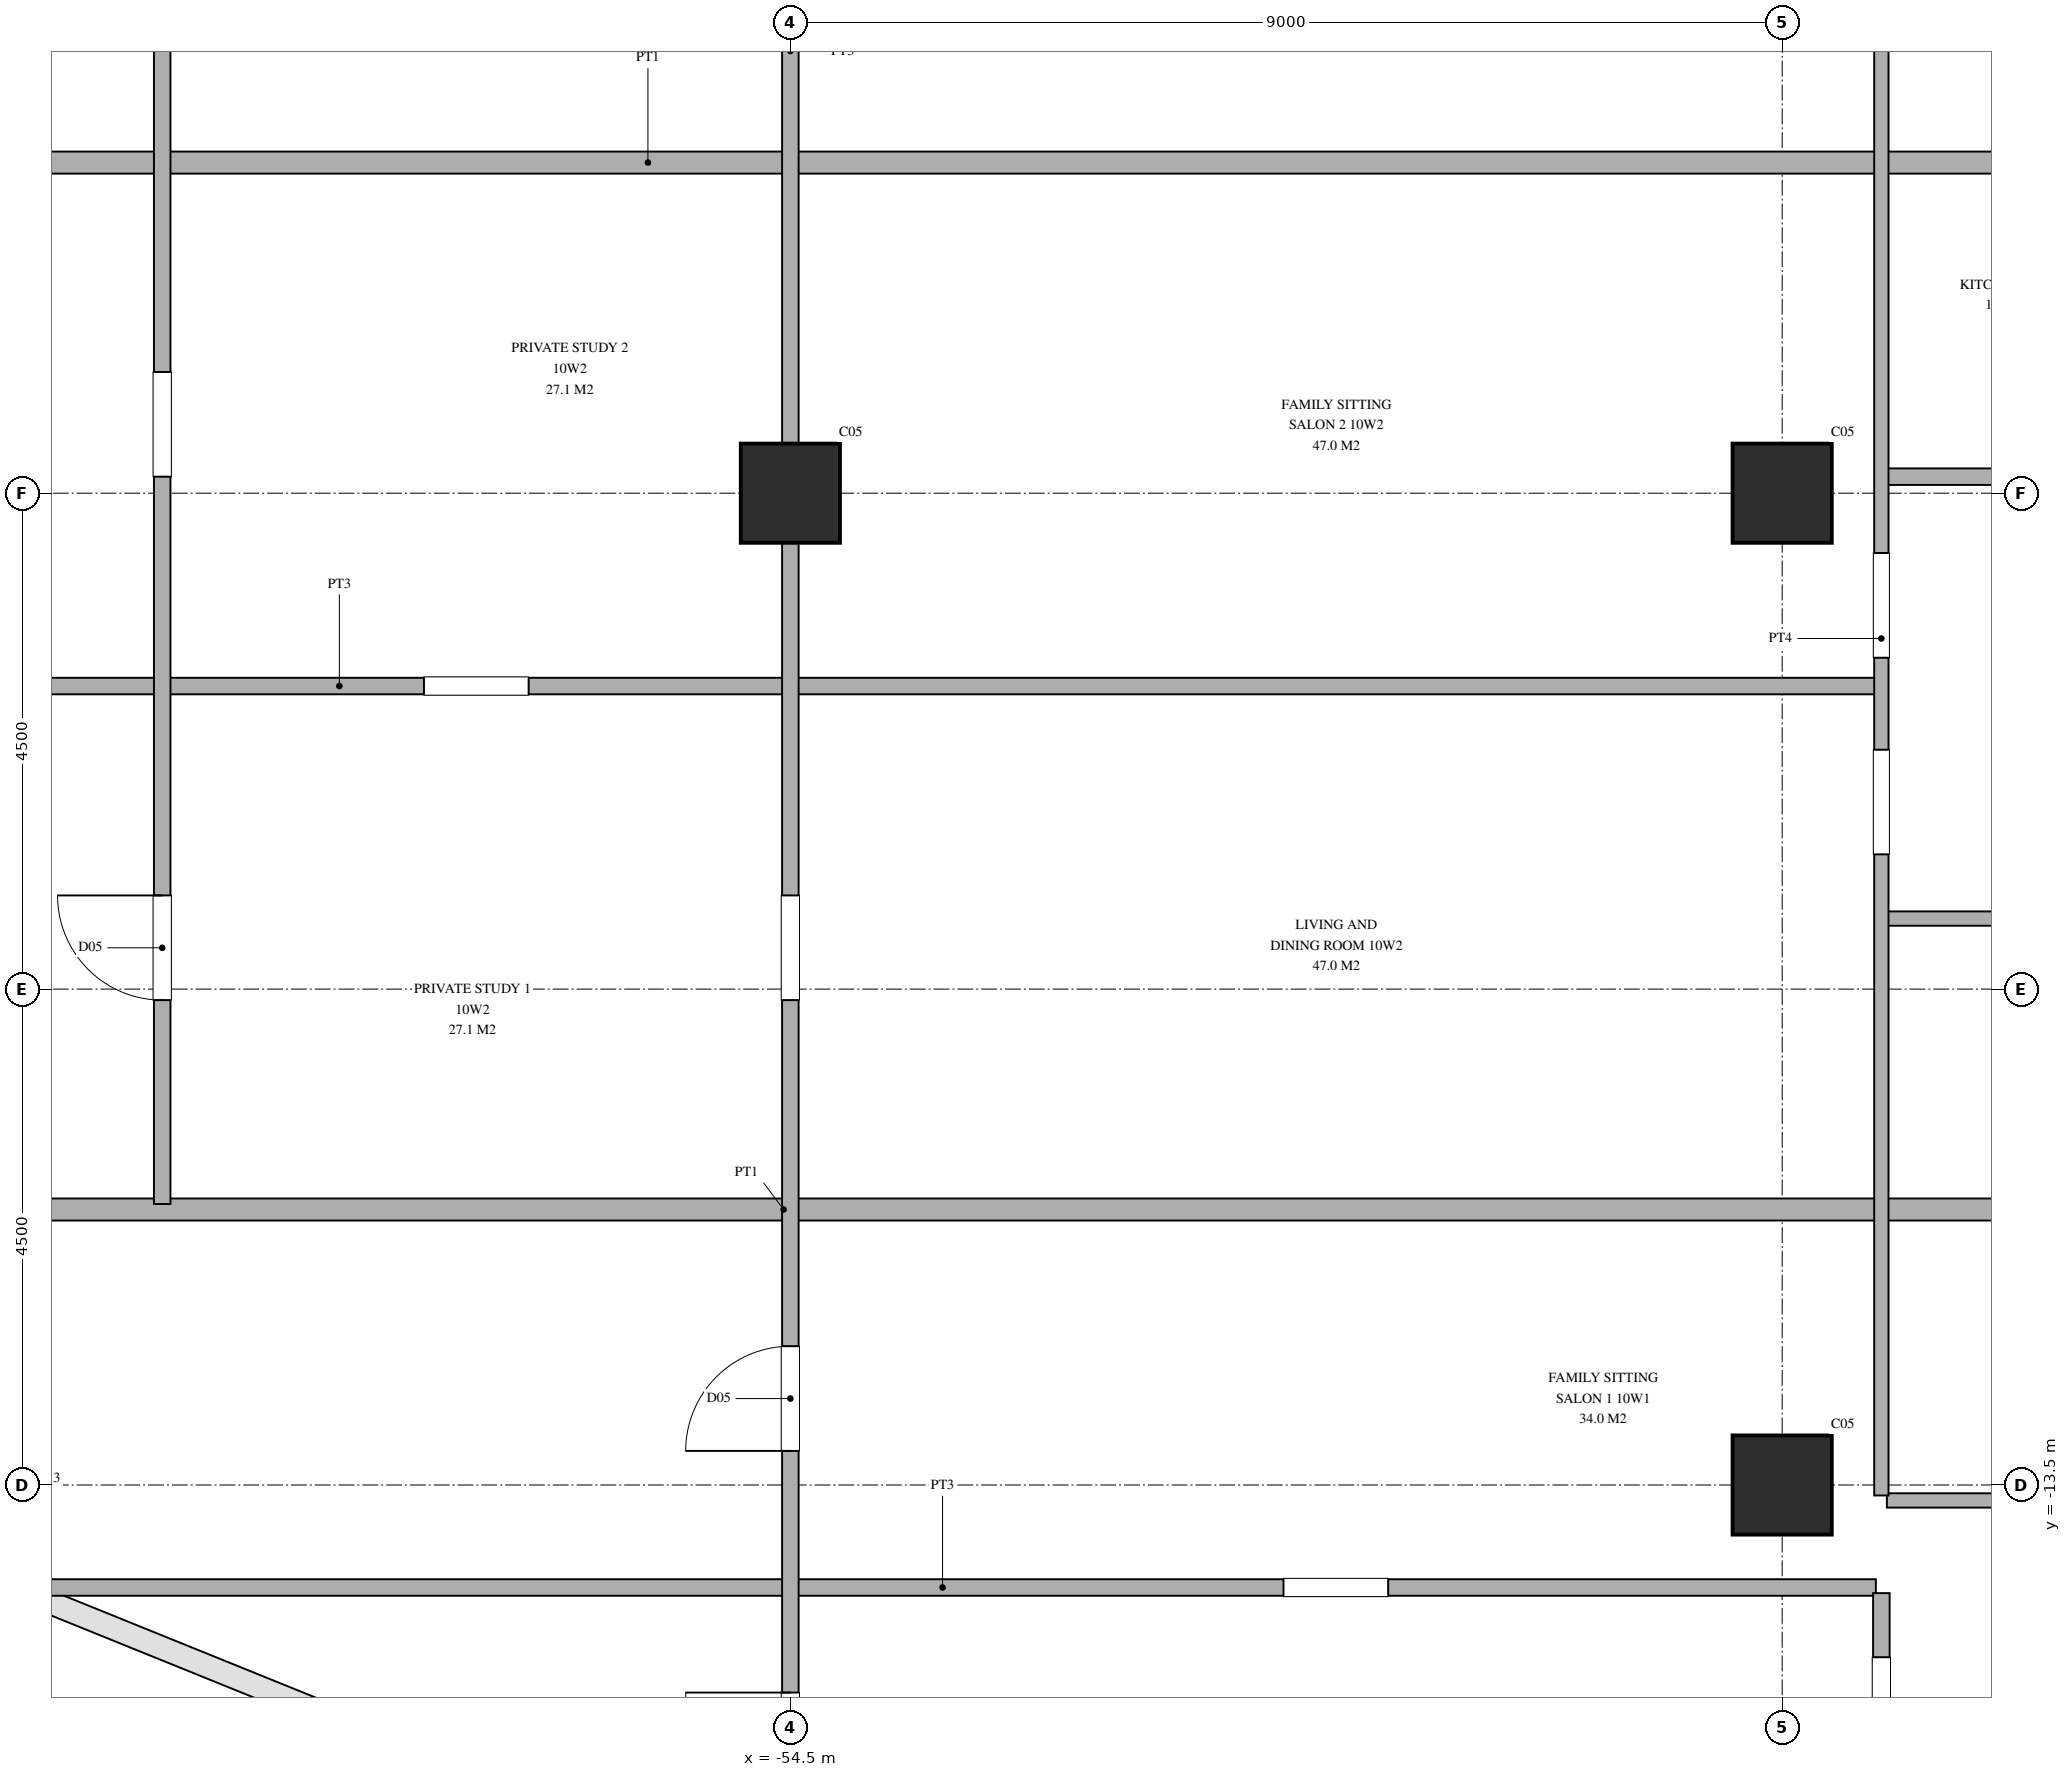
"""IFC4 building model, lengths in metres.
Left out: names, types, materials, properties, quantities, classifications, styles, units other than length and angle.
Written with IfcOpenShell. Run it as: python <this file> out.ifc"""

import sys

from ifc_helpers import new_model, si_unit, direction, frame, frame_2d, origin, origin_2d, place, context, subcontext, project, spatial, rectangle, i_section, extrude, source, transform, mapped, element, fill, save


model = new_model("IFC4")
c1 = context("Model", 3, precision=1e-05, world=origin(), true_north=direction((0.0, 1.0)))
c2 = subcontext(c1, "Body", "Model", "MODEL_VIEW")
j1 = project(units=[si_unit("LENGTHUNIT", "METRE"), si_unit("PLANEANGLEUNIT", "RADIAN")], contexts=[c1])
p1 = place(None, origin())
s1 = spatial("IfcSite", under=j1, at=p1, CompositionType="ELEMENT")
p2 = place(p1, origin())
s2 = spatial("IfcBuilding", under=s1, at=p2, CompositionType="ELEMENT")
p3 = place(p2, frame((0.0, 0.0, 40.5)))
s3 = spatial("IfcBuildingStorey", under=s2, at=p3, CompositionType="ELEMENT", Elevation=40.5)
m1 = source(origin(), c2, "Body", "SweptSolid", [
    extrude(i_section(OverallWidth=0.9, OverallDepth=0.9, WebThickness=0.036, FlangeThickness=0.055, at=origin_2d()), origin(), (0.0, 0.0, 1.0), 3.6),
])
for number, where, z_axis, x_axis in (
    (1, (-45.5, -13.5, 0.0), (0.0, 0.0, 1.0), (1.0, 0.0, 0.0)),
    (2, (-45.5, -4.5, 0.0), (0.0, 0.0, 1.0), (1.0, 0.0, 0.0)),
    (3, (-54.5, -4.5, 0.0), (0.0, 0.0, 1.0), (1.0, 0.0, 0.0)),
):
    element("IfcColumn", number, at=place(p3, frame(where, z_axis=z_axis, x_axis=x_axis)), inside=s3, PredefinedType="COLUMN", context=c2, shape_type="MappedRepresentation", body=[
        mapped(m1, transform((0.0, 0.0, 0.0), scale=1.0)),
    ])
p4 = place(p3, frame((-61.588, -14.43, 0.0), z_axis=(0.0, 0.0, 1.0), x_axis=(1.0, 0.0, 0.0)))
e4 = element("IfcWall", 4, at=p4, inside=s3, PredefinedType="PARTITIONING", context=c2, shape_type="SweptSolid", body=[
    extrude(rectangle(XDim=16.938, YDim=0.15, at=frame_2d((8.469, 0.0))), origin(), (0.0, 0.0, 1.0), 3.38),
])
p5 = place(p4, frame((11.563, 0.0, 0.0)))
e5 = element("IfcOpeningElement", 5, at=p5, cuts=e4, PredefinedType="OPENING", context=c2, shape_type="SweptSolid", body=[
    extrude(rectangle(XDim=0.95, YDim=2.15, at=frame_2d((0.475, 1.075))), frame((0.0, 0.085, 0.0), z_axis=(0.0, -1.0, 0.0), x_axis=(1.0, 0.0, 0.0)), (0.0, 0.0, 1.0), 0.17),
])
p6 = place(p3, frame((-44.55, -13.64, 0.0), z_axis=(0.0, 0.0, 1.0), x_axis=(1.0, 0.0, 0.0)))
e6 = element("IfcWall", 6, at=p6, inside=s3, PredefinedType="PARTITIONING", context=c2, shape_type="SweptSolid", body=[
    extrude(rectangle(XDim=5.5, YDim=0.13, at=frame_2d((2.75, 0.0))), origin(), (0.0, 0.0, 1.0), 2.68),
])
p7 = place(p6, frame((2.31, 0.0, 0.0)))
e7 = element("IfcOpeningElement", 7, at=p7, cuts=e6, PredefinedType="OPENING", context=c2, shape_type="SweptSolid", body=[
    extrude(rectangle(XDim=0.88, YDim=2.1, at=frame_2d((0.44, 1.05))), frame((0.0, 0.075, 0.0), z_axis=(0.0, -1.0, 0.0), x_axis=(1.0, 0.0, 0.0)), (0.0, 0.0, 1.0), 0.15),
])
p8 = place(p3, frame((-70.043, -11.0, 0.0), z_axis=(0.0, 0.0, 1.0), x_axis=(1.0, 0.0, 0.0)))
e8 = element("IfcWall", 8, at=p8, inside=s3, PredefinedType="PARTITIONING", context=c2, shape_type="SweptSolid", body=[
    extrude(rectangle(XDim=30.963, YDim=0.2, at=frame_2d((15.481, 0.0))), origin(), (0.0, 0.0, 1.0), 3.38),
])
p9 = place(p3, frame((-44.55, -8.36, 0.0), z_axis=(0.0, 0.0, 1.0), x_axis=(1.0, 0.0, 0.0)))
e9 = element("IfcWall", 9, at=p9, inside=s3, PredefinedType="PARTITIONING", context=c2, shape_type="SweptSolid", body=[
    extrude(rectangle(XDim=5.5, YDim=0.13, at=frame_2d((2.75, 0.0))), origin(), (0.0, 0.0, 1.0), 3.38),
])
p10 = place(p9, frame((2.31, 0.0, 0.0)))
e10 = element("IfcOpeningElement", 10, at=p10, cuts=e9, PredefinedType="OPENING", context=c2, shape_type="SweptSolid", body=[
    extrude(rectangle(XDim=0.88, YDim=2.1, at=frame_2d((0.44, 1.05))), frame((0.0, 0.075, 0.0), z_axis=(0.0, -1.0, 0.0), x_axis=(1.0, 0.0, 0.0)), (0.0, 0.0, 1.0), 0.15),
])
p11 = place(p3, frame((-72.535, -6.25, 0.0), z_axis=(0.0, 0.0, 1.0), x_axis=(1.0, 0.0, 0.0)))
e11 = element("IfcWall", 11, at=p11, inside=s3, PredefinedType="PARTITIONING", context=c2, shape_type="SweptSolid", body=[
    extrude(rectangle(XDim=27.885, YDim=0.15, at=frame_2d((13.942, 0.0))), origin(), (0.0, 0.0, 1.0), 3.38),
])
p12 = place(p11, frame((14.71, 0.0, 0.0)))
e12 = element("IfcOpeningElement", 12, at=p12, cuts=e11, PredefinedType="OPENING", context=c2, shape_type="SweptSolid", body=[
    extrude(rectangle(XDim=0.95, YDim=2.15, at=frame_2d((0.475, 1.075))), frame((0.0, 0.085, 0.0), z_axis=(0.0, -1.0, 0.0), x_axis=(1.0, 0.0, 0.0)), (0.0, 0.0, 1.0), 0.17),
])
p13 = place(p3, frame((-44.55, -4.35, 0.0), z_axis=(0.0, 0.0, 1.0), x_axis=(1.0, 0.0, 0.0)))
e13 = element("IfcWall", 13, at=p13, inside=s3, PredefinedType="PARTITIONING", context=c2, shape_type="SweptSolid", body=[
    extrude(rectangle(XDim=5.5, YDim=0.15, at=frame_2d((2.75, 0.0))), origin(), (0.0, 0.0, 1.0), 2.68),
])
p14 = place(p13, frame((2.275, 0.0, 0.0)))
e14 = element("IfcOpeningElement", 14, at=p14, cuts=e13, PredefinedType="OPENING", context=c2, shape_type="SweptSolid", body=[
    extrude(rectangle(XDim=0.95, YDim=2.15, at=frame_2d((0.475, 1.075))), frame((0.0, 0.085, 0.0), z_axis=(0.0, -1.0, 0.0), x_axis=(1.0, 0.0, 0.0)), (0.0, 0.0, 1.0), 0.17),
])
p15 = place(p3, frame((-72.505, -1.5, 0.0), z_axis=(0.0, 0.0, 1.0), x_axis=(1.0, 0.0, 0.0)))
e15 = element("IfcWall", 15, at=p15, inside=s3, PredefinedType="PARTITIONING", context=c2, shape_type="SweptSolid", body=[
    extrude(rectangle(XDim=33.425, YDim=0.2, at=frame_2d((16.712, 0.0))), origin(), (0.0, 0.0, 1.0), 3.38),
])
p16 = place(p3, frame((-60.2, -10.95, 0.0), z_axis=(0.0, 0.0, 1.0), x_axis=(0.0, 1.0, 0.0)))
e16 = element("IfcWall", 16, at=p16, inside=s3, PredefinedType="PARTITIONING", context=c2, shape_type="SweptSolid", body=[
    extrude(rectangle(XDim=22.4, YDim=0.15, at=frame_2d((11.2, 0.0))), origin(), (0.0, 0.0, 1.0), 3.38),
])
p17 = place(p16, frame((1.85, 0.0, 0.0)))
e17 = element("IfcOpeningElement", 17, at=p17, cuts=e16, PredefinedType="OPENING", context=c2, shape_type="SweptSolid", body=[
    extrude(rectangle(XDim=0.95, YDim=2.15, at=frame_2d((0.475, 1.075))), frame((0.0, 0.085, 0.0), z_axis=(0.0, -1.0, 0.0), x_axis=(1.0, 0.0, 0.0)), (0.0, 0.0, 1.0), 0.17),
])
p18 = place(p16, frame((6.6, 0.0, 0.0)))
e18 = element("IfcOpeningElement", 18, at=p18, cuts=e16, PredefinedType="OPENING", context=c2, shape_type="SweptSolid", body=[
    extrude(rectangle(XDim=0.95, YDim=2.15, at=frame_2d((0.475, 1.075))), frame((0.0, 0.085, 0.0), z_axis=(0.0, -1.0, 0.0), x_axis=(1.0, 0.0, 0.0)), (0.0, 0.0, 1.0), 0.17),
])
p19 = place(p16, frame((11.142, 0.0, 0.0)))
e19 = element("IfcOpeningElement", 19, at=p19, cuts=e16, PredefinedType="OPENING", context=c2, shape_type="SweptSolid", body=[
    extrude(rectangle(XDim=0.95, YDim=2.15, at=frame_2d((0.475, 1.075))), frame((0.0, 0.085, 0.0), z_axis=(0.0, -1.0, 0.0), x_axis=(1.0, 0.0, 0.0)), (0.0, 0.0, 1.0), 0.17),
])
p20 = place(p16, frame((15.475, 0.0, 0.0)))
e20 = element("IfcOpeningElement", 20, at=p20, cuts=e16, PredefinedType="OPENING", context=c2, shape_type="SweptSolid", body=[
    extrude(rectangle(XDim=0.95, YDim=2.15, at=frame_2d((0.475, 1.075))), frame((0.0, 0.085, 0.0), z_axis=(0.0, -1.0, 0.0), x_axis=(1.0, 0.0, 0.0)), (0.0, 0.0, 1.0), 0.17),
])
p21 = place(p16, frame((19.808, 0.0, 0.0)))
e21 = element("IfcOpeningElement", 21, at=p21, cuts=e16, PredefinedType="OPENING", context=c2, shape_type="SweptSolid", body=[
    extrude(rectangle(XDim=0.95, YDim=2.15, at=frame_2d((0.475, 1.075))), frame((0.0, 0.085, 0.0), z_axis=(0.0, -1.0, 0.0), x_axis=(1.0, 0.0, 0.0)), (0.0, 0.0, 1.0), 0.17),
])
p22 = place(p3, frame((-54.5, -17.321, 0.0), z_axis=(0.0, 0.0, 1.0), x_axis=(0.0, 1.0, 0.0)))
e22 = element("IfcWall", 22, at=p22, inside=s3, PredefinedType="PARTITIONING", context=c2, shape_type="SweptSolid", body=[
    extrude(rectangle(XDim=33.667, YDim=0.15, at=frame_2d((16.833, 0.0))), origin(), (0.0, 0.0, 1.0), 2.68),
])
p23 = place(p22, frame((0.988, 0.0, 0.0)))
e23 = element("IfcOpeningElement", 23, at=p23, cuts=e22, PredefinedType="OPENING", context=c2, shape_type="SweptSolid", body=[
    extrude(rectangle(XDim=0.95, YDim=2.15, at=frame_2d((0.475, 1.075))), frame((0.0, 0.085, 0.0), z_axis=(0.0, -1.0, 0.0), x_axis=(1.0, 0.0, 0.0)), (0.0, 0.0, 1.0), 0.17),
])
p24 = place(p22, frame((4.131, 0.0, 0.0)))
e24 = element("IfcOpeningElement", 24, at=p24, cuts=e22, PredefinedType="OPENING", context=c2, shape_type="SweptSolid", body=[
    extrude(rectangle(XDim=0.95, YDim=2.15, at=frame_2d((0.475, 1.075))), frame((0.0, 0.085, 0.0), z_axis=(0.0, -1.0, 0.0), x_axis=(1.0, 0.0, 0.0)), (0.0, 0.0, 1.0), 0.17),
])
p25 = place(p22, frame((8.221, 0.0, 0.0)))
e25 = element("IfcOpeningElement", 25, at=p25, cuts=e22, PredefinedType="OPENING", context=c2, shape_type="SweptSolid", body=[
    extrude(rectangle(XDim=0.95, YDim=2.15, at=frame_2d((0.475, 1.075))), frame((0.0, 0.085, 0.0), z_axis=(0.0, -1.0, 0.0), x_axis=(1.0, 0.0, 0.0)), (0.0, 0.0, 1.0), 0.17),
])
p26 = place(p22, frame((22.357, 0.0, 0.0)))
e26 = element("IfcOpeningElement", 26, at=p26, cuts=e22, PredefinedType="OPENING", context=c2, shape_type="SweptSolid", body=[
    extrude(rectangle(XDim=0.95, YDim=2.15, at=frame_2d((0.475, 1.075))), frame((0.0, 0.085, 0.0), z_axis=(0.0, -1.0, 0.0), x_axis=(1.0, 0.0, 0.0)), (0.0, 0.0, 1.0), 0.17),
])
p27 = place(p22, frame((30.794, 0.0, 0.0)))
e27 = element("IfcOpeningElement", 27, at=p27, cuts=e22, PredefinedType="OPENING", context=c2, shape_type="SweptSolid", body=[
    extrude(rectangle(XDim=0.95, YDim=2.15, at=frame_2d((0.475, 1.075))), frame((0.0, 0.085, 0.0), z_axis=(0.0, -1.0, 0.0), x_axis=(1.0, 0.0, 0.0)), (0.0, 0.0, 1.0), 0.17),
])
p28 = place(p3, frame((-44.6, -21.328, 0.0), z_axis=(0.0, 0.0, 1.0), x_axis=(0.0, 1.0, 0.0)))
e28 = element("IfcWall", 28, at=p28, inside=s3, PredefinedType="PARTITIONING", context=c2, shape_type="SweptSolid", body=[
    extrude(rectangle(XDim=6.847, YDim=0.15, at=frame_2d((3.423, 0.0))), origin(), (0.0, 0.0, 1.0), 3.38),
])
p29 = place(p28, frame((5.315, 0.0, 0.0)))
e29 = element("IfcOpeningElement", 29, at=p29, cuts=e28, PredefinedType="OPENING", context=c2, shape_type="SweptSolid", body=[
    extrude(rectangle(XDim=0.95, YDim=2.15, at=frame_2d((0.475, 1.075))), frame((0.0, 0.085, 0.0), z_axis=(0.0, -1.0, 0.0), x_axis=(1.0, 0.0, 0.0)), (0.0, 0.0, 1.0), 0.17),
])
p30 = place(p3, frame((-44.6, -13.595, 0.0), z_axis=(0.0, 0.0, 1.0), x_axis=(0.0, 1.0, 0.0)))
e30 = element("IfcWall", 30, at=p30, inside=s3, PredefinedType="PARTITIONING", context=c2, shape_type="SweptSolid", body=[
    extrude(rectangle(XDim=15.553, YDim=0.13, at=frame_2d((7.776, 0.0))), origin(), (0.0, 0.0, 1.0), 3.38),
])
p31 = place(p30, frame((5.817, 0.0, 0.0)))
e31 = element("IfcOpeningElement", 31, at=p31, cuts=e30, PredefinedType="OPENING", context=c2, shape_type="SweptSolid", body=[
    extrude(rectangle(XDim=0.95, YDim=2.15, at=frame_2d((0.475, 1.075))), frame((0.0, 0.075, 0.0), z_axis=(0.0, -1.0, 0.0), x_axis=(1.0, 0.0, 0.0)), (0.0, 0.0, 1.0), 0.15),
])
p32 = place(p30, frame((7.602, 0.0, 0.0)))
e32 = element("IfcOpeningElement", 32, at=p32, cuts=e30, PredefinedType="OPENING", context=c2, shape_type="SweptSolid", body=[
    extrude(rectangle(XDim=0.95, YDim=2.15, at=frame_2d((0.475, 1.075))), frame((0.0, 0.075, 0.0), z_axis=(0.0, -1.0, 0.0), x_axis=(1.0, 0.0, 0.0)), (0.0, 0.0, 1.0), 0.15),
])
m2 = source(origin(), c2, "Body", "SweptSolid", [
    extrude(rectangle(XDim=0.95, YDim=2.15, at=frame_2d((0.475, 1.075))), frame((0.0, 0.025, 0.0), z_axis=(0.0, -1.0, 0.0), x_axis=(1.0, 0.0, 0.0)), (0.0, 0.0, 1.0), 0.05),
])
p33 = place(p17, origin())
e33 = element("IfcDoor", 33, at=p33, inside=s3, OperationType="SINGLE_SWING_RIGHT", PredefinedType="DOOR", context=c2, shape_type="MappedRepresentation", body=[
    mapped(m2, transform((0.0, 0.0, 0.0), scale=1.0)),
])
fill(e17, e33)
p34 = place(p23, origin())
e34 = element("IfcDoor", 34, at=p34, inside=s3, OperationType="SINGLE_SWING_RIGHT", PredefinedType="DOOR", context=c2, shape_type="MappedRepresentation", body=[
    mapped(m2, transform((0.0, 0.0, 0.0), scale=1.0)),
])
fill(e23, e34)
p35 = place(p24, origin())
e35 = element("IfcDoor", 35, at=p35, inside=s3, OperationType="SINGLE_SWING_LEFT", PredefinedType="DOOR", context=c2, shape_type="MappedRepresentation", body=[
    mapped(m2, transform((0.0, 0.0, 0.0), scale=1.0)),
])
fill(e24, e35)
save(model, sys.argv[1])
